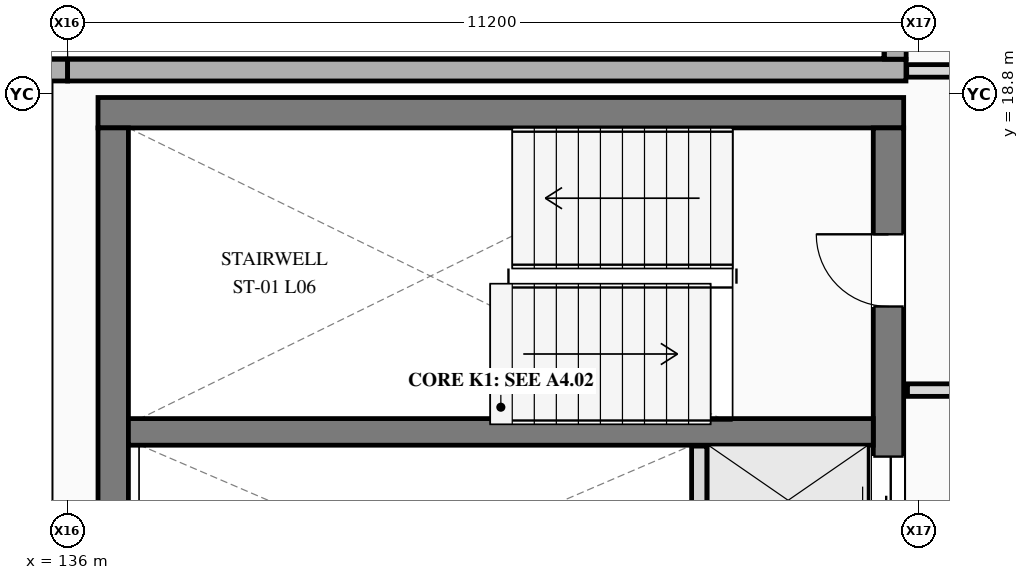
"""IFC4 building model, lengths in metres.
Left out: names, types, materials, properties, quantities, classifications, styles, units other than length and angle.
Written with IfcOpenShell. Run it as: python <this file> out.ifc"""

import sys

from ifc_helpers import new_model, si_unit, direction, frame, frame_2d, origin, place, context, subcontext, project, spatial, rectangle, extrude, element, fill, save


model = new_model("IFC4")
c1 = context("Model", 3, precision=1e-05, world=origin(), true_north=direction((0.0, 1.0)))
c2 = subcontext(c1, "Body", "Model", "MODEL_VIEW")
j1 = project(units=[si_unit("LENGTHUNIT", "METRE"), si_unit("PLANEANGLEUNIT", "RADIAN")], contexts=[c1])
p1 = place(None, origin())
s1 = spatial("IfcSite", under=j1, at=p1, CompositionType="ELEMENT")
p2 = place(p1, origin())
s2 = spatial("IfcBuilding", under=s1, at=p2, CompositionType="ELEMENT")
p3 = place(p2, frame((0.0, 0.0, 27.0)))
s3 = spatial("IfcBuildingStorey", under=s2, at=p3, CompositionType="ELEMENT", Elevation=27.0)
p4 = place(p3, frame((136.0, 19.11, 0.0), z_axis=(0.0, 0.0, 1.0), x_axis=(-1.0, 0.0, 0.0)))
e1 = element("IfcWall", 1, at=p4, inside=s3, PredefinedType="STANDARD", context=c2, shape_type="SweptSolid", body=[
    extrude(rectangle(XDim=12.0, YDim=0.285, at=frame_2d((6.0, 0.0))), origin(), (0.0, 0.0, 1.0), 3.6),
])
p5 = place(p4, frame((5.45, 0.0, 0.85)))
e2 = element("IfcOpeningElement", 2, at=p5, cuts=e1, PredefinedType="OPENING", context=c2, shape_type="SweptSolid", body=[
    extrude(rectangle(XDim=1.1, YDim=1.5, at=frame_2d((0.55, 0.75))), frame((0.0, 0.152, 0.0), z_axis=(0.0, -1.0, 0.0), x_axis=(1.0, 0.0, 0.0)), (0.0, 0.0, 1.0), 0.305),
])
p6 = place(p3, frame((147.03, 19.11, 0.0), z_axis=(0.0, 0.0, 1.0), x_axis=(-1.0, 0.0, 0.0)))
e3 = element("IfcWall", 3, at=p6, inside=s3, PredefinedType="STANDARD", context=c2, shape_type="SweptSolid", body=[
    extrude(rectangle(XDim=11.03, YDim=0.285, at=frame_2d((5.515, 0.0))), origin(), (0.0, 0.0, 1.0), 3.6),
])
p7 = place(p3, frame((146.89, 19.254, 0.0), z_axis=(0.0, 0.0, 1.0), x_axis=(0.0, 1.0, 0.0)))
e4 = element("IfcWall", 4, at=p7, inside=s3, PredefinedType="STANDARD", context=c2, shape_type="SweptSolid", body=[
    extrude(rectangle(XDim=5.546, YDim=0.285, at=frame_2d((2.773, 0.0))), origin(), (0.0, 0.0, 1.0), 3.6),
])
p8 = place(p7, frame((1.698, 0.0, 0.85)))
e5 = element("IfcOpeningElement", 5, at=p8, cuts=e4, PredefinedType="OPENING", context=c2, shape_type="SweptSolid", body=[
    extrude(rectangle(XDim=1.8, YDim=1.8, at=frame_2d((0.9, 0.9))), frame((0.0, 0.152, 0.0), z_axis=(0.0, -1.0, 0.0), x_axis=(1.0, 0.0, 0.0)), (0.0, 0.0, 1.0), 0.305),
])
p9 = place(p3, frame((147.0, 18.55, 0.0), z_axis=(0.0, 0.0, 1.0), x_axis=(-1.0, 0.0, 0.0)))
e6 = element("IfcWall", 6, at=p9, inside=s3, PredefinedType="SHEAR", context=c2, shape_type="SweptSolid", body=[
    extrude(rectangle(XDim=10.6, YDim=0.4, at=frame_2d((5.3, 0.0))), origin(), (0.0, 0.0, 1.0), 3.6),
])
p10 = place(p3, frame((136.6, 18.35, 0.0), z_axis=(0.0, 0.0, 1.0), x_axis=(0.0, -1.0, 0.0)))
e7 = element("IfcWall", 7, at=p10, inside=s3, PredefinedType="SHEAR", context=c2, shape_type="SweptSolid", body=[
    extrude(rectangle(XDim=7.35, YDim=0.4, at=frame_2d((3.675, 0.0))), origin(), (0.0, 0.0, 1.0), 3.6),
])
p11 = place(p3, frame((146.8, 11.0, 0.0), z_axis=(0.0, 0.0, 1.0), x_axis=(0.0, 1.0, 0.0)))
e8 = element("IfcWall", 8, at=p11, inside=s3, PredefinedType="SHEAR", context=c2, shape_type="SweptSolid", body=[
    extrude(rectangle(XDim=7.35, YDim=0.4, at=frame_2d((3.675, 0.0))), origin(), (0.0, 0.0, 1.0), 3.6),
])
p12 = place(p11, frame((5.0, 0.0, 0.0)))
e9 = element("IfcOpeningElement", 9, at=p12, cuts=e8, PredefinedType="OPENING", context=c2, shape_type="SweptSolid", body=[
    extrude(rectangle(XDim=0.95, YDim=2.2, at=frame_2d((0.475, 1.1))), frame((0.0, 0.21, 0.0), z_axis=(0.0, -1.0, 0.0), x_axis=(1.0, 0.0, 0.0)), (0.0, 0.0, 1.0), 0.42),
])
p13 = place(p11, frame((0.175, 0.0, 0.0)))
e10 = element("IfcOpeningElement", 10, at=p13, cuts=e8, PredefinedType="OPENING", context=c2, shape_type="SweptSolid", body=[
    extrude(rectangle(XDim=1.15, YDim=2.25, at=frame_2d((0.575, 1.125))), frame((0.0, 0.21, 0.0), z_axis=(0.0, -1.0, 0.0), x_axis=(1.0, 0.0, 0.0)), (0.0, 0.0, 1.0), 0.42),
])
p14 = place(p11, frame((1.875, 0.0, 0.0)))
e11 = element("IfcOpeningElement", 11, at=p14, cuts=e8, PredefinedType="OPENING", context=c2, shape_type="SweptSolid", body=[
    extrude(rectangle(XDim=1.15, YDim=2.25, at=frame_2d((0.575, 1.125))), frame((0.0, 0.21, 0.0), z_axis=(0.0, -1.0, 0.0), x_axis=(1.0, 0.0, 0.0)), (0.0, 0.0, 1.0), 0.42),
])
p15 = place(p3, frame((136.8, 14.35, 0.0), z_axis=(0.0, 0.0, 1.0), x_axis=(1.0, 0.0, 0.0)))
e12 = element("IfcWall", 12, at=p15, inside=s3, PredefinedType="SHEAR", context=c2, shape_type="SweptSolid", body=[
    extrude(rectangle(XDim=9.8, YDim=0.35, at=frame_2d((4.9, 0.0))), origin(), (0.0, 0.0, 1.0), 3.6),
])
p16 = place(p3, frame((144.31, 12.707, 0.0), z_axis=(0.0, 0.0, 1.0), x_axis=(0.0, 1.0, 0.0)))
e13 = element("IfcWall", 13, at=p16, inside=s3, PredefinedType="PLUMBINGWALL", context=c2, shape_type="SweptSolid", body=[
    extrude(rectangle(XDim=1.456, YDim=0.2, at=frame_2d((0.728, 0.0))), origin(), (0.0, 0.0, 1.0), 3.29),
])
p17 = place(p3, frame((147.05, 14.9, 0.0), z_axis=(0.0, 0.0, 1.0), x_axis=(1.0, 0.0, 0.0)))
e14 = element("IfcWall", 14, at=p17, inside=s3, PredefinedType="PARTITIONING", context=c2, shape_type="SweptSolid", body=[
    extrude(rectangle(XDim=4.55, YDim=0.165, at=frame_2d((2.275, 0.0))), origin(), (0.0, 0.0, 1.0), 3.29),
])
p18 = place(p17, frame((1.8, 0.0, 0.0)))
e15 = element("IfcOpeningElement", 15, at=p18, cuts=e14, PredefinedType="OPENING", context=c2, shape_type="SweptSolid", body=[
    extrude(rectangle(XDim=0.95, YDim=2.2, at=frame_2d((0.475, 1.1))), frame((0.0, 0.093, 0.0), z_axis=(0.0, -1.0, 0.0), x_axis=(1.0, 0.0, 0.0)), (0.0, 0.0, 1.0), 0.185),
])
p19 = place(p3, frame((147.04, 19.1, 0.0), z_axis=(0.0, 0.0, 1.0), x_axis=(1.0, 0.0, 0.0)))
e16 = element("IfcWall", 16, at=p19, inside=s3, PredefinedType="PARTITIONING", context=c2, shape_type="SweptSolid", body=[
    extrude(rectangle(XDim=8.22, YDim=0.165, at=frame_2d((4.11, 0.0))), origin(), (0.0, 0.0, 1.0), 3.29),
])
p20 = place(p12, origin())
e17 = element("IfcDoor", 17, at=p20, inside=s3, OperationType="SINGLE_SWING_RIGHT", PredefinedType="DOOR", context=c2, shape_type="SweptSolid", body=[
    extrude(rectangle(XDim=0.95, YDim=2.2, at=frame_2d((0.475, 1.1))), frame((0.0, 0.025, 0.0), z_axis=(0.0, -1.0, 0.0), x_axis=(1.0, 0.0, 0.0)), (0.0, 0.0, 1.0), 0.05),
])
fill(e9, e17)
p21 = place(p14, origin())
e18 = element("IfcDoor", 18, at=p21, inside=s3, OperationType="SLIDING_TO_RIGHT", PredefinedType="DOOR", context=c2, shape_type="SweptSolid", body=[
    extrude(rectangle(XDim=1.15, YDim=2.25, at=frame_2d((0.575, 1.125))), frame((0.0, 0.025, 0.0), z_axis=(0.0, -1.0, 0.0), x_axis=(1.0, 0.0, 0.0)), (0.0, 0.0, 1.0), 0.05),
])
fill(e11, e18)
save(model, sys.argv[1])
